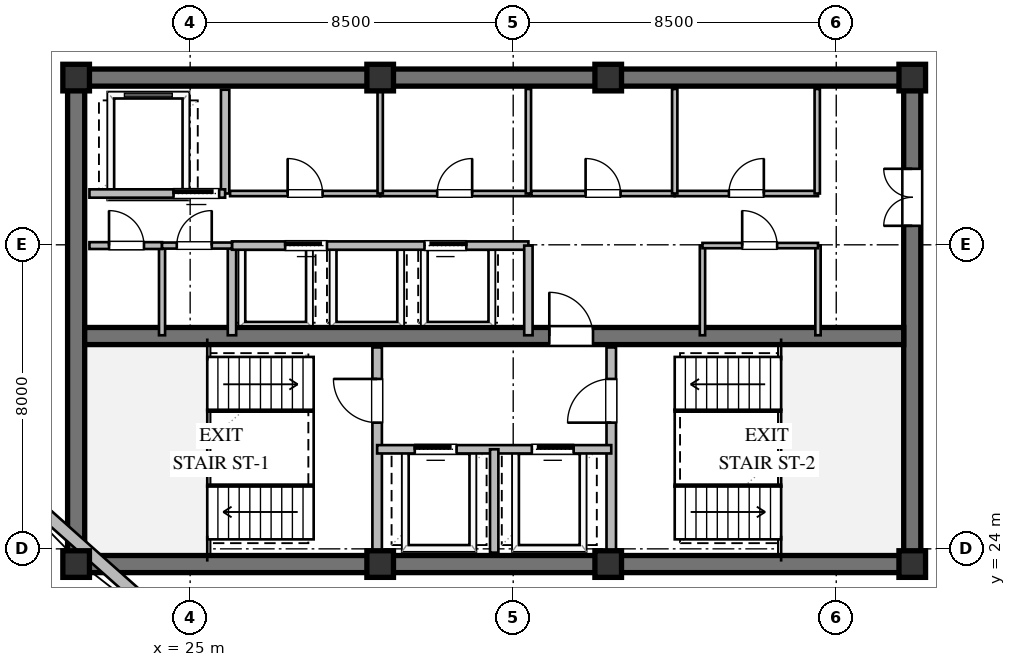
"""IFC4 building model, lengths in metres.
Left out: names, types, materials, properties, quantities, classifications, styles, units other than length and angle.
Written with IfcOpenShell. Run it as: python <this file> out.ifc"""

import sys

from ifc_helpers import new_model, si_unit, direction, frame, frame_2d, origin, origin_2d, place, context, subcontext, project, spatial, rectangle, extrude, element, fill, save


model = new_model("IFC4")
c1 = context("Model", 3, precision=1e-05, world=origin(), true_north=direction((0.0, 1.0)))
c2 = subcontext(c1, "Body", "Model", "MODEL_VIEW")
j1 = project(units=[si_unit("LENGTHUNIT", "METRE"), si_unit("PLANEANGLEUNIT", "RADIAN")], contexts=[c1])
p1 = place(None, origin())
s1 = spatial("IfcSite", under=j1, at=p1, CompositionType="ELEMENT")
p2 = place(p1, origin())
s2 = spatial("IfcBuilding", under=s1, at=p2, CompositionType="ELEMENT")
p3 = place(p2, frame((0.0, 0.0, 258.6)))
s3 = spatial("IfcBuildingStorey", under=s2, at=p3, CompositionType="ELEMENT", Elevation=258.6)
for number, where, z_axis, x_axis in (
    (1, (21.775, 23.6, 0.0), (0.0, 0.0, 1.0), (1.0, 0.0, 0.0)),
    (2, (21.775, 36.4, 0.0), (0.0, 0.0, 1.0), (1.0, 0.0, 0.0)),
):
    element("IfcWall", number, at=place(p3, frame(where, z_axis=z_axis, x_axis=x_axis)), inside=s3, PredefinedType="SHEAR", context=c2, shape_type="SweptSolid", body=[
        extrude(rectangle(XDim=22.45, YDim=0.45, at=frame_2d((11.225, 0.0))), origin(), (0.0, 0.0, 1.0), 3.56),
    ])
p4 = place(p3, frame((22.0, 23.825, 0.0), z_axis=(0.0, 0.0, 1.0), x_axis=(0.0, 1.0, 0.0)))
e3 = element("IfcWall", 3, at=p4, inside=s3, PredefinedType="SHEAR", context=c2, shape_type="SweptSolid", body=[
    extrude(rectangle(XDim=12.35, YDim=0.45, at=frame_2d((6.175, 0.0))), origin(), (0.0, 0.0, 1.0), 3.56),
])
p5 = place(p3, frame((44.0, 23.825, 0.0), z_axis=(0.0, 0.0, 1.0), x_axis=(0.0, 1.0, 0.0)))
e4 = element("IfcWall", 4, at=p5, inside=s3, PredefinedType="SHEAR", context=c2, shape_type="SweptSolid", body=[
    extrude(rectangle(XDim=12.35, YDim=0.45, at=frame_2d((6.175, 0.0))), origin(), (0.0, 0.0, 1.0), 3.56),
])
p6 = place(p5, frame((8.675, 0.0, 0.0)))
e5 = element("IfcOpeningElement", 5, at=p6, cuts=e4, PredefinedType="OPENING", context=c2, shape_type="SweptSolid", body=[
    extrude(rectangle(XDim=1.5, YDim=2.15, at=frame_2d((0.75, 1.075))), frame((0.0, 0.235, 0.0), z_axis=(0.0, -1.0, 0.0), x_axis=(1.0, 0.0, 0.0)), (0.0, 0.0, 1.0), 0.47),
])
p7 = place(p3, frame((22.225, 29.6, 0.0), z_axis=(0.0, 0.0, 1.0), x_axis=(1.0, 0.0, 0.0)))
e6 = element("IfcWall", 6, at=p7, inside=s3, PredefinedType="SHEAR", context=c2, shape_type="SweptSolid", body=[
    extrude(rectangle(XDim=21.55, YDim=0.45, at=frame_2d((10.775, 0.0))), origin(), (0.0, 0.0, 1.0), 3.56),
])
p8 = place(p7, frame((12.225, 0.0, 0.0)))
e7 = element("IfcOpeningElement", 7, at=p8, cuts=e6, PredefinedType="OPENING", context=c2, shape_type="SweptSolid", body=[
    extrude(rectangle(XDim=1.15, YDim=2.1, at=frame_2d((0.575, 1.05))), frame((0.0, 0.235, 0.0), z_axis=(0.0, -1.0, 0.0), x_axis=(1.0, 0.0, 0.0)), (0.0, 0.0, 1.0), 0.47),
])
for number, where, z_axis, x_axis in (
    (8, (22.0, 23.6, 0.0), (0.0, 0.0, 1.0), (1.0, 0.0, 0.0)),
    (9, (30.0, 23.6, 0.0), (0.0, 0.0, 1.0), (1.0, 0.0, 0.0)),
    (10, (36.0, 23.6, 0.0), (0.0, 0.0, 1.0), (1.0, 0.0, 0.0)),
    (11, (44.0, 23.6, 0.0), (0.0, 0.0, 1.0), (1.0, 0.0, 0.0)),
    (12, (44.0, 36.4, 0.0), (0.0, 0.0, 1.0), (1.0, 0.0, 0.0)),
    (13, (36.0, 36.4, 0.0), (0.0, 0.0, 1.0), (1.0, 0.0, 0.0)),
    (14, (30.0, 36.4, 0.0), (0.0, 0.0, 1.0), (1.0, 0.0, 0.0)),
    (15, (22.0, 36.4, 0.0), (0.0, 0.0, 1.0), (1.0, 0.0, 0.0)),
):
    element("IfcColumn", number, at=place(p3, frame(where, z_axis=z_axis, x_axis=x_axis)), inside=s3, PredefinedType="COLUMN", context=c2, shape_type="SweptSolid", body=[
        extrude(rectangle(XDim=0.7, YDim=0.7, at=origin_2d()), origin(), (0.0, 0.0, 1.0), 3.8),
    ])
p9 = place(p3, frame((24.648, 21.849, 0.0), z_axis=(0.0, 0.0, 1.0), x_axis=(-0.747068410291, 0.664747162721, 0.0)))
e16 = element("IfcWall", 16, at=p9, inside=s3, PredefinedType="STANDARD", context=c2, shape_type="SweptSolid", body=[
    extrude(rectangle(XDim=5.928, YDim=0.32, at=frame_2d((2.964, 0.0))), origin(), (0.0, 0.0, 1.0), 2.35),
])
p10 = place(p3, frame((29.92, 23.9, 0.0), z_axis=(0.0, 0.0, 1.0), x_axis=(0.0, 1.0, 0.0)))
e17 = element("IfcWall", 17, at=p10, inside=s3, PredefinedType="SOLIDWALL", context=c2, shape_type="SweptSolid", body=[
    extrude(rectangle(XDim=5.4, YDim=0.25, at=frame_2d((2.7, 0.0))), origin(), (0.0, 0.0, 1.0), 3.006),
])
p11 = place(p10, frame((3.421, 0.0, 0.0)))
e18 = element("IfcOpeningElement", 18, at=p11, cuts=e17, PredefinedType="OPENING", context=c2, shape_type="SweptSolid", body=[
    extrude(rectangle(XDim=1.15, YDim=2.1, at=frame_2d((0.575, 1.05))), frame((0.0, 0.135, 0.0), z_axis=(0.0, -1.0, 0.0), x_axis=(1.0, 0.0, 0.0)), (0.0, 0.0, 1.0), 0.27),
])
p12 = place(p3, frame((36.08, 23.9, 0.0), z_axis=(0.0, 0.0, 1.0), x_axis=(0.0, 1.0, 0.0)))
e19 = element("IfcWall", 19, at=p12, inside=s3, PredefinedType="SOLIDWALL", context=c2, shape_type="SweptSolid", body=[
    extrude(rectangle(XDim=5.4, YDim=0.25, at=frame_2d((2.7, 0.0))), origin(), (0.0, 0.0, 1.0), 3.56),
])
p13 = place(p12, frame((3.421, 0.0, 0.0)))
e20 = element("IfcOpeningElement", 20, at=p13, cuts=e19, PredefinedType="OPENING", context=c2, shape_type="SweptSolid", body=[
    extrude(rectangle(XDim=1.15, YDim=2.1, at=frame_2d((0.575, 1.05))), frame((0.0, 0.135, 0.0), z_axis=(0.0, -1.0, 0.0), x_axis=(1.0, 0.0, 0.0)), (0.0, 0.0, 1.0), 0.27),
])
p14 = place(p3, frame((29.92, 26.62, 0.0), z_axis=(0.0, 0.0, 1.0), x_axis=(1.0, 0.0, 0.0)))
e21 = element("IfcWall", 21, at=p14, inside=s3, PredefinedType="SOLIDWALL", context=c2, shape_type="SweptSolid", body=[
    extrude(rectangle(XDim=6.16, YDim=0.22, at=frame_2d((3.08, 0.0))), origin(), (0.0, 0.0, 1.0), 3.56),
])
p15 = place(p14, frame((0.99, 0.0, 0.0)))
e22 = element("IfcOpeningElement", 22, at=p15, cuts=e21, PredefinedType="OPENING", context=c2, shape_type="SweptSolid", body=[
    extrude(rectangle(XDim=1.1, YDim=2.1, at=frame_2d((0.55, 1.05))), frame((0.0, 0.12, 0.0), z_axis=(0.0, -1.0, 0.0), x_axis=(1.0, 0.0, 0.0)), (0.0, 0.0, 1.0), 0.24),
])
p16 = place(p14, frame((4.07, 0.0, 0.0)))
e23 = element("IfcOpeningElement", 23, at=p16, cuts=e21, PredefinedType="OPENING", context=c2, shape_type="SweptSolid", body=[
    extrude(rectangle(XDim=1.1, YDim=2.1, at=frame_2d((0.55, 1.05))), frame((0.0, 0.12, 0.0), z_axis=(0.0, -1.0, 0.0), x_axis=(1.0, 0.0, 0.0)), (0.0, 0.0, 1.0), 0.24),
])
p17 = place(p3, frame((33.0, 23.9, 0.0), z_axis=(0.0, 0.0, 1.0), x_axis=(0.0, 1.0, 0.0)))
e24 = element("IfcWall", 24, at=p17, inside=s3, PredefinedType="SOLIDWALL", context=c2, shape_type="SweptSolid", body=[
    extrude(rectangle(XDim=2.72, YDim=0.22, at=frame_2d((1.36, 0.0))), origin(), (0.0, 0.0, 1.0), 3.56),
])
p18 = place(p3, frame((25.92, 33.35, 0.0), z_axis=(0.0, 0.0, 1.0), x_axis=(0.0, 1.0, 0.0)))
e25 = element("IfcWall", 25, at=p18, inside=s3, PredefinedType="SOLIDWALL", context=c2, shape_type="SweptSolid", body=[
    extrude(rectangle(XDim=2.73, YDim=0.22, at=frame_2d((1.365, 0.0))), origin(), (0.0, 0.0, 1.0), 3.56),
])
p19 = place(p3, frame((22.35, 33.35, 0.0), z_axis=(0.0, 0.0, 1.0), x_axis=(1.0, 0.0, 0.0)))
e26 = element("IfcWall", 26, at=p19, inside=s3, PredefinedType="SOLIDWALL", context=c2, shape_type="SweptSolid", body=[
    extrude(rectangle(XDim=3.57, YDim=0.22, at=frame_2d((1.785, 0.0))), origin(), (0.0, 0.0, 1.0), 3.56),
])
p20 = place(p19, frame((2.213, 0.0, 0.0)))
e27 = element("IfcOpeningElement", 27, at=p20, cuts=e26, PredefinedType="OPENING", context=c2, shape_type="SweptSolid", body=[
    extrude(rectangle(XDim=1.2, YDim=2.1, at=frame_2d((0.6, 1.05))), frame((0.0, 0.12, 0.0), z_axis=(0.0, -1.0, 0.0), x_axis=(1.0, 0.0, 0.0)), (0.0, 0.0, 1.0), 0.24),
])
p21 = place(p3, frame((26.1, 29.62, 0.0), z_axis=(0.0, 0.0, 1.0), x_axis=(0.0, 1.0, 0.0)))
e28 = element("IfcWall", 28, at=p21, inside=s3, PredefinedType="SOLIDWALL", context=c2, shape_type="SweptSolid", body=[
    extrude(rectangle(XDim=2.36, YDim=0.22, at=frame_2d((1.18, 0.0))), origin(), (0.0, 0.0, 1.0), 3.56),
])
p22 = place(p3, frame((26.1, 31.98, 0.0), z_axis=(0.0, 0.0, 1.0), x_axis=(1.0, 0.0, 0.0)))
e29 = element("IfcWall", 29, at=p22, inside=s3, PredefinedType="SOLIDWALL", context=c2, shape_type="SweptSolid", body=[
    extrude(rectangle(XDim=7.8, YDim=0.22, at=frame_2d((3.9, 0.0))), origin(), (0.0, 0.0, 1.0), 3.56),
])
p23 = place(p22, frame((1.4, 0.0, 0.0)))
e30 = element("IfcOpeningElement", 30, at=p23, cuts=e29, PredefinedType="OPENING", context=c2, shape_type="SweptSolid", body=[
    extrude(rectangle(XDim=1.1, YDim=2.1, at=frame_2d((0.55, 1.05))), frame((0.0, 0.12, 0.0), z_axis=(0.0, -1.0, 0.0), x_axis=(1.0, 0.0, 0.0)), (0.0, 0.0, 1.0), 0.24),
])
p24 = place(p22, frame((5.066, 0.0, 0.0)))
e31 = element("IfcOpeningElement", 31, at=p24, cuts=e29, PredefinedType="OPENING", context=c2, shape_type="SweptSolid", body=[
    extrude(rectangle(XDim=1.1, YDim=2.1, at=frame_2d((0.55, 1.05))), frame((0.0, 0.12, 0.0), z_axis=(0.0, -1.0, 0.0), x_axis=(1.0, 0.0, 0.0)), (0.0, 0.0, 1.0), 0.24),
])
p25 = place(p3, frame((33.9, 29.62, 0.0), z_axis=(0.0, 0.0, 1.0), x_axis=(0.0, 1.0, 0.0)))
e32 = element("IfcWall", 32, at=p25, inside=s3, PredefinedType="SOLIDWALL", context=c2, shape_type="SweptSolid", body=[
    extrude(rectangle(XDim=2.36, YDim=0.22, at=frame_2d((1.18, 0.0))), origin(), (0.0, 0.0, 1.0), 3.56),
])
p26 = place(p3, frame((26.05, 33.35, 0.0), z_axis=(0.0, 0.0, 1.0), x_axis=(1.0, 0.0, 0.0)))
e33 = element("IfcWall", 33, at=p26, inside=s3, PredefinedType="PARTITIONING", context=c2, shape_type="SweptSolid", body=[
    extrude(rectangle(XDim=3.95, YDim=0.14, at=frame_2d((1.975, 0.0))), origin(), (0.0, 0.0, 1.0), 3.56),
])
p27 = place(p26, frame((1.515, 0.0, 0.0)))
e34 = element("IfcOpeningElement", 34, at=p27, cuts=e33, PredefinedType="OPENING", context=c2, shape_type="SweptSolid", body=[
    extrude(rectangle(XDim=0.92, YDim=2.1, at=frame_2d((0.46, 1.05))), frame((0.0, 0.08, 0.0), z_axis=(0.0, -1.0, 0.0), x_axis=(1.0, 0.0, 0.0)), (0.0, 0.0, 1.0), 0.16),
])
p28 = place(p3, frame((30.0, 33.35, 0.0), z_axis=(0.0, 0.0, 1.0), x_axis=(1.0, 0.0, 0.0)))
e35 = element("IfcWall", 35, at=p28, inside=s3, PredefinedType="PARTITIONING", context=c2, shape_type="SweptSolid", body=[
    extrude(rectangle(XDim=3.92, YDim=0.14, at=frame_2d((1.96, 0.0))), origin(), (0.0, 0.0, 1.0), 3.56),
])
p29 = place(p28, frame((1.5, 0.0, 0.0)))
e36 = element("IfcOpeningElement", 36, at=p29, cuts=e35, PredefinedType="OPENING", context=c2, shape_type="SweptSolid", body=[
    extrude(rectangle(XDim=0.92, YDim=2.1, at=frame_2d((0.46, 1.05))), frame((0.0, 0.08, 0.0), z_axis=(0.0, -1.0, 0.0), x_axis=(1.0, 0.0, 0.0)), (0.0, 0.0, 1.0), 0.16),
])
for number, where, z_axis, x_axis in (
    (37, (30.0, 33.35, 0.0), (0.0, 0.0, 1.0), (0.0, 1.0, 0.0)),
    (38, (33.9, 33.35, 0.0), (0.0, 0.0, 1.0), (0.0, 1.0, 0.0)),
):
    element("IfcWall", number, at=place(p3, frame(where, z_axis=z_axis, x_axis=x_axis)), inside=s3, PredefinedType="PARTITIONING", context=c2, shape_type="SweptSolid", body=[
        extrude(rectangle(XDim=2.75, YDim=0.14, at=frame_2d((1.375, 0.0))), origin(), (0.0, 0.0, 1.0), 3.56),
    ])
p30 = place(p3, frame((33.98, 33.35, 0.0), z_axis=(0.0, 0.0, 1.0), x_axis=(1.0, 0.0, 0.0)))
e39 = element("IfcWall", 39, at=p30, inside=s3, PredefinedType="PARTITIONING", context=c2, shape_type="SweptSolid", body=[
    extrude(rectangle(XDim=3.77, YDim=0.14, at=frame_2d((1.885, 0.0))), origin(), (0.0, 0.0, 1.0), 3.56),
])
p31 = place(p30, frame((1.425, 0.0, 0.0)))
e40 = element("IfcOpeningElement", 40, at=p31, cuts=e39, PredefinedType="OPENING", context=c2, shape_type="SweptSolid", body=[
    extrude(rectangle(XDim=0.92, YDim=2.1, at=frame_2d((0.46, 1.05))), frame((0.0, 0.08, 0.0), z_axis=(0.0, -1.0, 0.0), x_axis=(1.0, 0.0, 0.0)), (0.0, 0.0, 1.0), 0.16),
])
p32 = place(p3, frame((37.75, 33.35, 0.0), z_axis=(0.0, 0.0, 1.0), x_axis=(1.0, 0.0, 0.0)))
e41 = element("IfcWall", 41, at=p32, inside=s3, PredefinedType="PARTITIONING", context=c2, shape_type="SweptSolid", body=[
    extrude(rectangle(XDim=3.77, YDim=0.14, at=frame_2d((1.885, 0.0))), origin(), (0.0, 0.0, 1.0), 3.56),
])
p33 = place(p32, frame((1.425, 0.0, 0.0)))
e42 = element("IfcOpeningElement", 42, at=p33, cuts=e41, PredefinedType="OPENING", context=c2, shape_type="SweptSolid", body=[
    extrude(rectangle(XDim=0.92, YDim=2.1, at=frame_2d((0.46, 1.05))), frame((0.0, 0.08, 0.0), z_axis=(0.0, -1.0, 0.0), x_axis=(1.0, 0.0, 0.0)), (0.0, 0.0, 1.0), 0.16),
])
for number, where, z_axis, x_axis in (
    (43, (37.75, 33.35, 0.0), (0.0, 0.0, 1.0), (0.0, 1.0, 0.0)),
    (44, (41.5, 33.35, 0.0), (0.0, 0.0, 1.0), (0.0, 1.0, 0.0)),
):
    element("IfcWall", number, at=place(p3, frame(where, z_axis=z_axis, x_axis=x_axis)), inside=s3, PredefinedType="PARTITIONING", context=c2, shape_type="SweptSolid", body=[
        extrude(rectangle(XDim=2.75, YDim=0.14, at=frame_2d((1.375, 0.0))), origin(), (0.0, 0.0, 1.0), 3.56),
    ])
p34 = place(p3, frame((24.26, 29.62, 0.0), z_axis=(0.0, 0.0, 1.0), x_axis=(0.0, 1.0, 0.0)))
e45 = element("IfcWall", 45, at=p34, inside=s3, PredefinedType="PLUMBINGWALL", context=c2, shape_type="SweptSolid", body=[
    extrude(rectangle(XDim=2.36, YDim=0.16, at=frame_2d((1.18, 0.0))), origin(), (0.0, 0.0, 1.0), 3.56),
])
p35 = place(p3, frame((22.35, 31.98, 0.0), z_axis=(0.0, 0.0, 1.0), x_axis=(1.0, 0.0, 0.0)))
e46 = element("IfcWall", 46, at=p35, inside=s3, PredefinedType="PARTITIONING", context=c2, shape_type="SweptSolid", body=[
    extrude(rectangle(XDim=1.91, YDim=0.18, at=frame_2d((0.955, 0.0))), origin(), (0.0, 0.0, 1.0), 3.56),
])
p36 = place(p35, frame((0.515, 0.0, 0.0)))
e47 = element("IfcOpeningElement", 47, at=p36, cuts=e46, PredefinedType="OPENING", context=c2, shape_type="SweptSolid", body=[
    extrude(rectangle(XDim=0.92, YDim=2.1, at=frame_2d((0.46, 1.05))), frame((0.0, 0.1, 0.0), z_axis=(0.0, -1.0, 0.0), x_axis=(1.0, 0.0, 0.0)), (0.0, 0.0, 1.0), 0.2),
])
p37 = place(p3, frame((24.26, 31.98, 0.0), z_axis=(0.0, 0.0, 1.0), x_axis=(1.0, 0.0, 0.0)))
e48 = element("IfcWall", 48, at=p37, inside=s3, PredefinedType="PLUMBINGWALL", context=c2, shape_type="SweptSolid", body=[
    extrude(rectangle(XDim=1.84, YDim=0.16, at=frame_2d((0.92, 0.0))), origin(), (0.0, 0.0, 1.0), 3.56),
])
p38 = place(p37, frame((0.388, 0.0, 0.0)))
e49 = element("IfcOpeningElement", 49, at=p38, cuts=e48, PredefinedType="OPENING", context=c2, shape_type="SweptSolid", body=[
    extrude(rectangle(XDim=0.92, YDim=2.1, at=frame_2d((0.46, 1.05))), frame((0.0, 0.09, 0.0), z_axis=(0.0, -1.0, 0.0), x_axis=(1.0, 0.0, 0.0)), (0.0, 0.0, 1.0), 0.18),
])
for number, where, z_axis, x_axis in (
    (50, (38.48, 29.62, 0.0), (0.0, 0.0, 1.0), (0.0, 1.0, 0.0)),
    (51, (41.52, 29.62, 0.0), (0.0, 0.0, 1.0), (0.0, 1.0, 0.0)),
):
    element("IfcWall", number, at=place(p3, frame(where, z_axis=z_axis, x_axis=x_axis)), inside=s3, PredefinedType="PARTITIONING", context=c2, shape_type="SweptSolid", body=[
        extrude(rectangle(XDim=2.36, YDim=0.14, at=frame_2d((1.18, 0.0))), origin(), (0.0, 0.0, 1.0), 3.56),
    ])
p39 = place(p3, frame((38.48, 31.98, 0.0), z_axis=(0.0, 0.0, 1.0), x_axis=(1.0, 0.0, 0.0)))
e52 = element("IfcWall", 52, at=p39, inside=s3, PredefinedType="PARTITIONING", context=c2, shape_type="SweptSolid", body=[
    extrude(rectangle(XDim=3.04, YDim=0.14, at=frame_2d((1.52, 0.0))), origin(), (0.0, 0.0, 1.0), 3.56),
])
p40 = place(p39, frame((1.045, 0.0, 0.0)))
e53 = element("IfcOpeningElement", 53, at=p40, cuts=e52, PredefinedType="OPENING", context=c2, shape_type="SweptSolid", body=[
    extrude(rectangle(XDim=0.92, YDim=2.1, at=frame_2d((0.46, 1.05))), frame((0.0, 0.08, 0.0), z_axis=(0.0, -1.0, 0.0), x_axis=(1.0, 0.0, 0.0)), (0.0, 0.0, 1.0), 0.16),
])
p41 = place(p11, origin())
e54 = element("IfcDoor", 54, at=p41, inside=s3, OperationType="SINGLE_SWING_RIGHT", PredefinedType="DOOR", context=c2, shape_type="SweptSolid", body=[
    extrude(rectangle(XDim=1.15, YDim=2.1, at=frame_2d((0.575, 1.05))), frame((0.0, 0.025, 0.0), z_axis=(0.0, -1.0, 0.0), x_axis=(1.0, 0.0, 0.0)), (0.0, 0.0, 1.0), 0.05),
])
fill(e18, e54)
p42 = place(p13, origin())
e55 = element("IfcDoor", 55, at=p42, inside=s3, OperationType="SINGLE_SWING_LEFT", PredefinedType="DOOR", context=c2, shape_type="SweptSolid", body=[
    extrude(rectangle(XDim=1.15, YDim=2.1, at=frame_2d((0.575, 1.05))), frame((0.0, 0.025, 0.0), z_axis=(0.0, -1.0, 0.0), x_axis=(1.0, 0.0, 0.0)), (0.0, 0.0, 1.0), 0.05),
])
fill(e20, e55)
p43 = place(p15, origin())
e56 = element("IfcDoor", 56, at=p43, inside=s3, OperationType="SLIDING_TO_LEFT", PredefinedType="DOOR", context=c2, shape_type="SweptSolid", body=[
    extrude(rectangle(XDim=1.1, YDim=2.1, at=frame_2d((0.55, 1.05))), frame((0.0, 0.025, 0.0), z_axis=(0.0, -1.0, 0.0), x_axis=(1.0, 0.0, 0.0)), (0.0, 0.0, 1.0), 0.05),
])
fill(e22, e56)
p44 = place(p16, origin())
e57 = element("IfcDoor", 57, at=p44, inside=s3, OperationType="SLIDING_TO_RIGHT", PredefinedType="DOOR", context=c2, shape_type="SweptSolid", body=[
    extrude(rectangle(XDim=1.1, YDim=2.1, at=frame_2d((0.55, 1.05))), frame((0.0, 0.025, 0.0), z_axis=(0.0, -1.0, 0.0), x_axis=(1.0, 0.0, 0.0)), (0.0, 0.0, 1.0), 0.05),
])
fill(e23, e57)
p45 = place(p8, origin())
e58 = element("IfcDoor", 58, at=p45, inside=s3, OperationType="SINGLE_SWING_LEFT", PredefinedType="DOOR", context=c2, shape_type="SweptSolid", body=[
    extrude(rectangle(XDim=1.15, YDim=2.1, at=frame_2d((0.575, 1.05))), frame((0.0, 0.025, 0.0), z_axis=(0.0, -1.0, 0.0), x_axis=(1.0, 0.0, 0.0)), (0.0, 0.0, 1.0), 0.05),
])
fill(e7, e58)
p46 = place(p6, origin())
e59 = element("IfcDoor", 59, at=p46, inside=s3, OperationType="DOUBLE_DOOR_SINGLE_SWING", PredefinedType="DOOR", context=c2, shape_type="SweptSolid", body=[
    extrude(rectangle(XDim=1.5, YDim=2.15, at=frame_2d((0.75, 1.075))), frame((0.0, 0.025, 0.0), z_axis=(0.0, -1.0, 0.0), x_axis=(1.0, 0.0, 0.0)), (0.0, 0.0, 1.0), 0.05),
])
fill(e5, e59)
p47 = place(p20, origin())
e60 = element("IfcDoor", 60, at=p47, inside=s3, OperationType="SLIDING_TO_LEFT", PredefinedType="DOOR", context=c2, shape_type="SweptSolid", body=[
    extrude(rectangle(XDim=1.2, YDim=2.1, at=frame_2d((0.6, 1.05))), frame((0.0, 0.025, 0.0), z_axis=(0.0, -1.0, 0.0), x_axis=(1.0, 0.0, 0.0)), (0.0, 0.0, 1.0), 0.05),
])
fill(e27, e60)
p48 = place(p23, origin())
e61 = element("IfcDoor", 61, at=p48, inside=s3, OperationType="SLIDING_TO_LEFT", PredefinedType="DOOR", context=c2, shape_type="SweptSolid", body=[
    extrude(rectangle(XDim=1.1, YDim=2.1, at=frame_2d((0.55, 1.05))), frame((0.0, 0.025, 0.0), z_axis=(0.0, -1.0, 0.0), x_axis=(1.0, 0.0, 0.0)), (0.0, 0.0, 1.0), 0.05),
])
fill(e30, e61)
p49 = place(p24, origin())
e62 = element("IfcDoor", 62, at=p49, inside=s3, OperationType="SLIDING_TO_RIGHT", PredefinedType="DOOR", context=c2, shape_type="SweptSolid", body=[
    extrude(rectangle(XDim=1.1, YDim=2.1, at=frame_2d((0.55, 1.05))), frame((0.0, 0.025, 0.0), z_axis=(0.0, -1.0, 0.0), x_axis=(1.0, 0.0, 0.0)), (0.0, 0.0, 1.0), 0.05),
])
fill(e31, e62)
p50 = place(p27, origin())
e63 = element("IfcDoor", 63, at=p50, inside=s3, OperationType="SINGLE_SWING_LEFT", PredefinedType="DOOR", context=c2, shape_type="SweptSolid", body=[
    extrude(rectangle(XDim=0.92, YDim=2.1, at=frame_2d((0.46, 1.05))), frame((0.0, 0.025, 0.0), z_axis=(0.0, -1.0, 0.0), x_axis=(1.0, 0.0, 0.0)), (0.0, 0.0, 1.0), 0.05),
])
fill(e34, e63)
p51 = place(p29, origin())
e64 = element("IfcDoor", 64, at=p51, inside=s3, OperationType="SINGLE_SWING_RIGHT", PredefinedType="DOOR", context=c2, shape_type="SweptSolid", body=[
    extrude(rectangle(XDim=0.92, YDim=2.1, at=frame_2d((0.46, 1.05))), frame((0.0, 0.025, 0.0), z_axis=(0.0, -1.0, 0.0), x_axis=(1.0, 0.0, 0.0)), (0.0, 0.0, 1.0), 0.05),
])
fill(e36, e64)
p52 = place(p31, origin())
e65 = element("IfcDoor", 65, at=p52, inside=s3, OperationType="SINGLE_SWING_LEFT", PredefinedType="DOOR", context=c2, shape_type="SweptSolid", body=[
    extrude(rectangle(XDim=0.92, YDim=2.1, at=frame_2d((0.46, 1.05))), frame((0.0, 0.025, 0.0), z_axis=(0.0, -1.0, 0.0), x_axis=(1.0, 0.0, 0.0)), (0.0, 0.0, 1.0), 0.05),
])
fill(e40, e65)
p53 = place(p33, origin())
e66 = element("IfcDoor", 66, at=p53, inside=s3, OperationType="SINGLE_SWING_RIGHT", PredefinedType="DOOR", context=c2, shape_type="SweptSolid", body=[
    extrude(rectangle(XDim=0.92, YDim=2.1, at=frame_2d((0.46, 1.05))), frame((0.0, 0.025, 0.0), z_axis=(0.0, -1.0, 0.0), x_axis=(1.0, 0.0, 0.0)), (0.0, 0.0, 1.0), 0.05),
])
fill(e42, e66)
p54 = place(p36, origin())
e67 = element("IfcDoor", 67, at=p54, inside=s3, OperationType="SINGLE_SWING_LEFT", PredefinedType="DOOR", context=c2, shape_type="SweptSolid", body=[
    extrude(rectangle(XDim=0.92, YDim=2.1, at=frame_2d((0.46, 1.05))), frame((0.0, 0.025, 0.0), z_axis=(0.0, -1.0, 0.0), x_axis=(1.0, 0.0, 0.0)), (0.0, 0.0, 1.0), 0.05),
])
fill(e47, e67)
p55 = place(p38, origin())
e68 = element("IfcDoor", 68, at=p55, inside=s3, OperationType="SINGLE_SWING_RIGHT", PredefinedType="DOOR", context=c2, shape_type="SweptSolid", body=[
    extrude(rectangle(XDim=0.92, YDim=2.1, at=frame_2d((0.46, 1.05))), frame((0.0, 0.025, 0.0), z_axis=(0.0, -1.0, 0.0), x_axis=(1.0, 0.0, 0.0)), (0.0, 0.0, 1.0), 0.05),
])
fill(e49, e68)
p56 = place(p40, origin())
e69 = element("IfcDoor", 69, at=p56, inside=s3, OperationType="SINGLE_SWING_LEFT", PredefinedType="DOOR", context=c2, shape_type="SweptSolid", body=[
    extrude(rectangle(XDim=0.92, YDim=2.1, at=frame_2d((0.46, 1.05))), frame((0.0, 0.025, 0.0), z_axis=(0.0, -1.0, 0.0), x_axis=(1.0, 0.0, 0.0)), (0.0, 0.0, 1.0), 0.05),
])
fill(e53, e69)
save(model, sys.argv[1])
